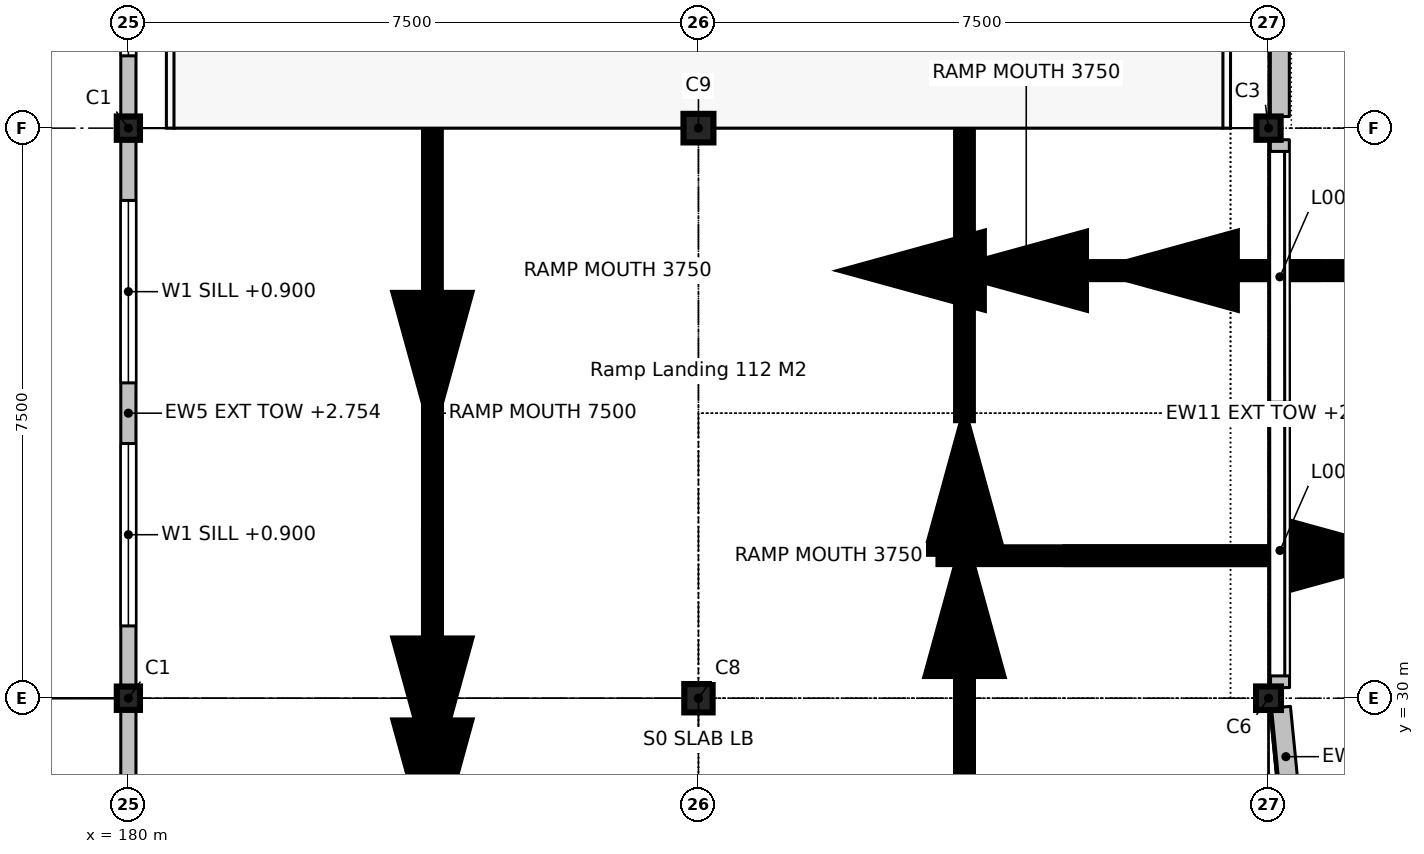
"""IFC4 building model, lengths in metres.
Left out: names, types, materials, properties, quantities, classifications, styles, units other than length and angle.
Written with IfcOpenShell. Run it as: python <this file> out.ifc"""

import sys

from ifc_helpers import new_model, si_unit, direction, frame, frame_2d, origin, origin_2d, place, context, subcontext, project, spatial, rectangle, i_section, extrude, element, fill, save


model = new_model("IFC4")
c1 = context("Model", 3, precision=1e-05, world=origin(), true_north=direction((0.0, 1.0)))
c2 = subcontext(c1, "Body", "Model", "MODEL_VIEW")
j1 = project(units=[si_unit("LENGTHUNIT", "METRE"), si_unit("PLANEANGLEUNIT", "RADIAN")], contexts=[c1])
p1 = place(None, origin())
s1 = spatial("IfcSite", under=j1, at=p1, CompositionType="ELEMENT")
p2 = place(p1, origin())
s2 = spatial("IfcBuilding", under=s1, at=p2, CompositionType="ELEMENT")
p3 = place(p2, origin())
s3 = spatial("IfcBuildingStorey", under=s2, at=p3, CompositionType="ELEMENT", Elevation=0.0)
for number, where, z_axis, x_axis in (
    (1, (180.0, 30.0, -0.25), (0.0, 0.0, 1.0), (1.0, 0.0, 0.0)),
    (2, (180.0, 37.5, -0.25), (0.0, 0.0, 1.0), (1.0, 0.0, 0.0)),
):
    element("IfcColumn", number, at=place(p3, frame(where, z_axis=z_axis, x_axis=x_axis)), inside=s3, PredefinedType="COLUMN", context=c2, shape_type="SweptSolid", body=[
        extrude(i_section(OverallWidth=0.305, OverallDepth=0.307, WebThickness=0.01, FlangeThickness=0.015, FilletRadius=0.015, at=origin_2d()), origin(), (0.0, 0.0, 1.0), 3.55),
    ])
p4 = place(p3, frame((187.5, 30.0, -0.25), z_axis=(0.0, 0.0, 1.0), x_axis=(1.0, 0.0, 0.0)))
e3 = element("IfcColumn", 3, at=p4, inside=s3, PredefinedType="COLUMN", context=c2, shape_type="SweptSolid", body=[
    extrude(i_section(OverallWidth=0.373, OverallDepth=0.373, WebThickness=0.016, FlangeThickness=0.026, FilletRadius=0.015, at=origin_2d()), origin(), (0.0, 0.0, 1.0), 3.55),
])
p5 = place(p3, frame((187.5, 37.5, -0.25), z_axis=(0.0, 0.0, 1.0), x_axis=(1.0, 0.0, 0.0)))
e4 = element("IfcColumn", 4, at=p5, inside=s3, PredefinedType="COLUMN", context=c2, shape_type="SweptSolid", body=[
    extrude(i_section(OverallWidth=0.394, OverallDepth=0.376, WebThickness=0.017, FlangeThickness=0.028, FilletRadius=0.015, at=origin_2d()), origin(), (0.0, 0.0, 1.0), 3.55),
])
p6 = place(p3, frame((195.0, 37.5, -0.25), z_axis=(0.0, 0.0, 1.0), x_axis=(0.0, 1.0, 0.0)))
e5 = element("IfcColumn", 5, at=p6, inside=s3, PredefinedType="COLUMN", context=c2, shape_type="SweptSolid", body=[
    extrude(i_section(OverallWidth=0.307, OverallDepth=0.318, WebThickness=0.013, FlangeThickness=0.021, FilletRadius=0.015, at=origin_2d()), origin(), (0.0, 0.0, 1.0), 3.55),
])
p7 = place(p3, frame((195.0, 30.0, -0.25), z_axis=(0.0, 0.0, 1.0), x_axis=(0.0, 1.0, 0.0)))
e6 = element("IfcColumn", 6, at=p7, inside=s3, PredefinedType="COLUMN", context=c2, shape_type="SweptSolid", body=[
    extrude(i_section(OverallWidth=0.31, OverallDepth=0.328, WebThickness=0.015, FlangeThickness=0.025, FilletRadius=0.015, at=origin_2d()), origin(), (0.0, 0.0, 1.0), 3.55),
])
p8 = place(p3, frame((195.149, 44.847, 0.0), z_axis=(0.0, 0.0, 1.0), x_axis=(0.0, -1.0, 0.0)))
e7 = element("IfcWall", 7, at=p8, inside=s3, PredefinedType="SOLIDWALL", context=c2, shape_type="SweptSolid", body=[
    extrude(rectangle(XDim=7.195, YDim=0.25, at=frame_2d((3.597, 0.0))), origin(), (0.0, 0.0, 1.0), 1.1),
])
p9 = place(p3, frame((195.149, 37.347, 0.0), z_axis=(0.0, 0.0, 1.0), x_axis=(0.000406476492, -0.999999917388, 0.0)))
e8 = element("IfcWall", 8, at=p9, inside=s3, PredefinedType="SOLIDWALL", context=c2, shape_type="SweptSolid", body=[
    extrude(rectangle(XDim=7.208, YDim=0.25, at=frame_2d((3.604, 0.0))), origin(), (0.0, 0.0, 1.0), 2.6),
])
p10 = place(p9, frame((0.154, 0.0, 0.0)))
e9 = element("IfcOpeningElement", 9, at=p10, cuts=e8, PredefinedType="OPENING", context=c2, shape_type="SweptSolid", body=[
    extrude(rectangle(XDim=3.3, YDim=2.5, at=frame_2d((1.65, 1.25))), frame((0.0, 0.135, 0.0), z_axis=(0.0, -1.0, 0.0), x_axis=(1.0, 0.0, 0.0)), (0.0, 0.0, 1.0), 0.27),
])
p11 = place(p9, frame((3.754, 0.0, 0.0)))
e10 = element("IfcOpeningElement", 10, at=p11, cuts=e8, PredefinedType="OPENING", context=c2, shape_type="SweptSolid", body=[
    extrude(rectangle(XDim=3.3, YDim=2.5, at=frame_2d((1.65, 1.25))), frame((0.0, 0.135, 0.0), z_axis=(0.0, -1.0, 0.0), x_axis=(1.0, 0.0, 0.0)), (0.0, 0.0, 1.0), 0.27),
])
p12 = place(p3, frame((195.164, 29.881, 0.0), z_axis=(0.0, 0.0, 1.0), x_axis=(0.098115845086, -0.99517500016, 0.0)))
e11 = element("IfcWall", 11, at=p12, inside=s3, PredefinedType="SOLIDWALL", context=c2, shape_type="SweptSolid", body=[
    extrude(rectangle(XDim=1.306, YDim=0.25, at=frame_2d((0.653, 0.0))), origin(), (0.0, 0.0, 1.0), 1.1),
])
p13 = place(p3, frame((180.0, 22.654, 0.0), z_axis=(0.0, 0.0, 1.0), x_axis=(0.0, 1.0, 0.0)))
e12 = element("IfcWall", 12, at=p13, inside=s3, PredefinedType="SOLIDWALL", context=c2, shape_type="SweptSolid", body=[
    extrude(rectangle(XDim=7.193, YDim=0.2, at=frame_2d((3.596, 0.0))), origin(), (0.0, 0.0, 1.0), 2.71),
])
p14 = place(p13, frame((1.098, 0.0, 1.1)))
e13 = element("IfcOpeningElement", 13, at=p14, cuts=e12, PredefinedType="OPENING", context=c2, shape_type="SweptSolid", body=[
    extrude(rectangle(XDim=1.8, YDim=1.4, at=frame_2d((0.9, 0.7))), frame((0.0, 0.11, 0.0), z_axis=(0.0, -1.0, 0.0), x_axis=(1.0, 0.0, 0.0)), (0.0, 0.0, 1.0), 0.22),
])
p15 = place(p13, frame((4.295, 0.0, 1.1)))
e14 = element("IfcOpeningElement", 14, at=p15, cuts=e12, PredefinedType="OPENING", context=c2, shape_type="SweptSolid", body=[
    extrude(rectangle(XDim=1.8, YDim=1.4, at=frame_2d((0.9, 0.7))), frame((0.0, 0.11, 0.0), z_axis=(0.0, -1.0, 0.0), x_axis=(1.0, 0.0, 0.0)), (0.0, 0.0, 1.0), 0.22),
])
p16 = place(p3, frame((180.0, 30.154, 0.0), z_axis=(0.0, 0.0, 1.0), x_axis=(0.0, 1.0, 0.0)))
e15 = element("IfcWall", 15, at=p16, inside=s3, PredefinedType="SOLIDWALL", context=c2, shape_type="SweptSolid", body=[
    extrude(rectangle(XDim=7.193, YDim=0.2, at=frame_2d((3.596, 0.0))), origin(), (0.0, 0.0, 1.0), 2.754),
])
p17 = place(p16, frame((0.798, 0.0, 0.9)))
e16 = element("IfcOpeningElement", 16, at=p17, cuts=e15, PredefinedType="OPENING", context=c2, shape_type="SweptSolid", body=[
    extrude(rectangle(XDim=2.4, YDim=1.5, at=frame_2d((1.2, 0.75))), frame((0.0, 0.11, 0.0), z_axis=(0.0, -1.0, 0.0), x_axis=(1.0, 0.0, 0.0)), (0.0, 0.0, 1.0), 0.22),
])
p18 = place(p16, frame((3.995, 0.0, 0.9)))
e17 = element("IfcOpeningElement", 17, at=p18, cuts=e15, PredefinedType="OPENING", context=c2, shape_type="SweptSolid", body=[
    extrude(rectangle(XDim=2.4, YDim=1.5, at=frame_2d((1.2, 0.75))), frame((0.0, 0.11, 0.0), z_axis=(0.0, -1.0, 0.0), x_axis=(1.0, 0.0, 0.0)), (0.0, 0.0, 1.0), 0.22),
])
p19 = place(p3, frame((180.0, 37.654, 0.0), z_axis=(0.0, 0.0, 1.0), x_axis=(0.0, 1.0, 0.0)))
e18 = element("IfcWall", 18, at=p19, inside=s3, PredefinedType="SOLIDWALL", context=c2, shape_type="SweptSolid", body=[
    extrude(rectangle(XDim=7.193, YDim=0.2, at=frame_2d((3.596, 0.0))), origin(), (0.0, 0.0, 1.0), 2.71),
])
p20 = place(p19, frame((0.798, 0.0, 0.9)))
e19 = element("IfcOpeningElement", 19, at=p20, cuts=e18, PredefinedType="OPENING", context=c2, shape_type="SweptSolid", body=[
    extrude(rectangle(XDim=2.4, YDim=1.5, at=frame_2d((1.2, 0.75))), frame((0.0, 0.11, 0.0), z_axis=(0.0, -1.0, 0.0), x_axis=(1.0, 0.0, 0.0)), (0.0, 0.0, 1.0), 0.22),
])
p21 = place(p19, frame((3.995, 0.0, 0.9)))
e20 = element("IfcOpeningElement", 20, at=p21, cuts=e18, PredefinedType="OPENING", context=c2, shape_type="SweptSolid", body=[
    extrude(rectangle(XDim=2.4, YDim=1.5, at=frame_2d((1.2, 0.75))), frame((0.0, 0.11, 0.0), z_axis=(0.0, -1.0, 0.0), x_axis=(1.0, 0.0, 0.0)), (0.0, 0.0, 1.0), 0.22),
])
p22 = place(p10, origin())
e21 = element("IfcDoor", 21, at=p22, inside=s3, OperationType="ROLLINGUP", PredefinedType="DOOR", context=c2, shape_type="SweptSolid", body=[
    extrude(rectangle(XDim=3.3, YDim=2.5, at=frame_2d((1.65, 1.25))), frame((0.0, 0.025, 0.0), z_axis=(0.0, -1.0, 0.0), x_axis=(1.0, 0.0, 0.0)), (0.0, 0.0, 1.0), 0.05),
])
fill(e9, e21)
p23 = place(p11, origin())
e22 = element("IfcDoor", 22, at=p23, inside=s3, OperationType="ROLLINGUP", PredefinedType="DOOR", context=c2, shape_type="SweptSolid", body=[
    extrude(rectangle(XDim=3.3, YDim=2.5, at=frame_2d((1.65, 1.25))), frame((0.0, 0.025, 0.0), z_axis=(0.0, -1.0, 0.0), x_axis=(1.0, 0.0, 0.0)), (0.0, 0.0, 1.0), 0.05),
])
fill(e10, e22)
p24 = place(p17, origin())
e23 = element("IfcWindow", 23, at=p24, inside=s3, PartitioningType="DOUBLE_PANEL_VERTICAL", PredefinedType="WINDOW", context=c2, shape_type="SweptSolid", body=[
    extrude(rectangle(XDim=2.4, YDim=1.5, at=frame_2d((1.2, 0.75))), frame((0.0, 0.03, 0.0), z_axis=(0.0, -1.0, 0.0), x_axis=(1.0, 0.0, 0.0)), (0.0, 0.0, 1.0), 0.06),
])
fill(e16, e23)
p25 = place(p18, origin())
e24 = element("IfcWindow", 24, at=p25, inside=s3, PartitioningType="DOUBLE_PANEL_VERTICAL", PredefinedType="WINDOW", context=c2, shape_type="SweptSolid", body=[
    extrude(rectangle(XDim=2.4, YDim=1.5, at=frame_2d((1.2, 0.75))), frame((0.0, 0.03, 0.0), z_axis=(0.0, -1.0, 0.0), x_axis=(1.0, 0.0, 0.0)), (0.0, 0.0, 1.0), 0.06),
])
fill(e17, e24)
p26 = place(p20, origin())
e25 = element("IfcWindow", 25, at=p26, inside=s3, PartitioningType="DOUBLE_PANEL_VERTICAL", PredefinedType="WINDOW", context=c2, shape_type="SweptSolid", body=[
    extrude(rectangle(XDim=2.4, YDim=1.5, at=frame_2d((1.2, 0.75))), frame((0.0, 0.03, 0.0), z_axis=(0.0, -1.0, 0.0), x_axis=(1.0, 0.0, 0.0)), (0.0, 0.0, 1.0), 0.06),
])
fill(e19, e25)
save(model, sys.argv[1])
